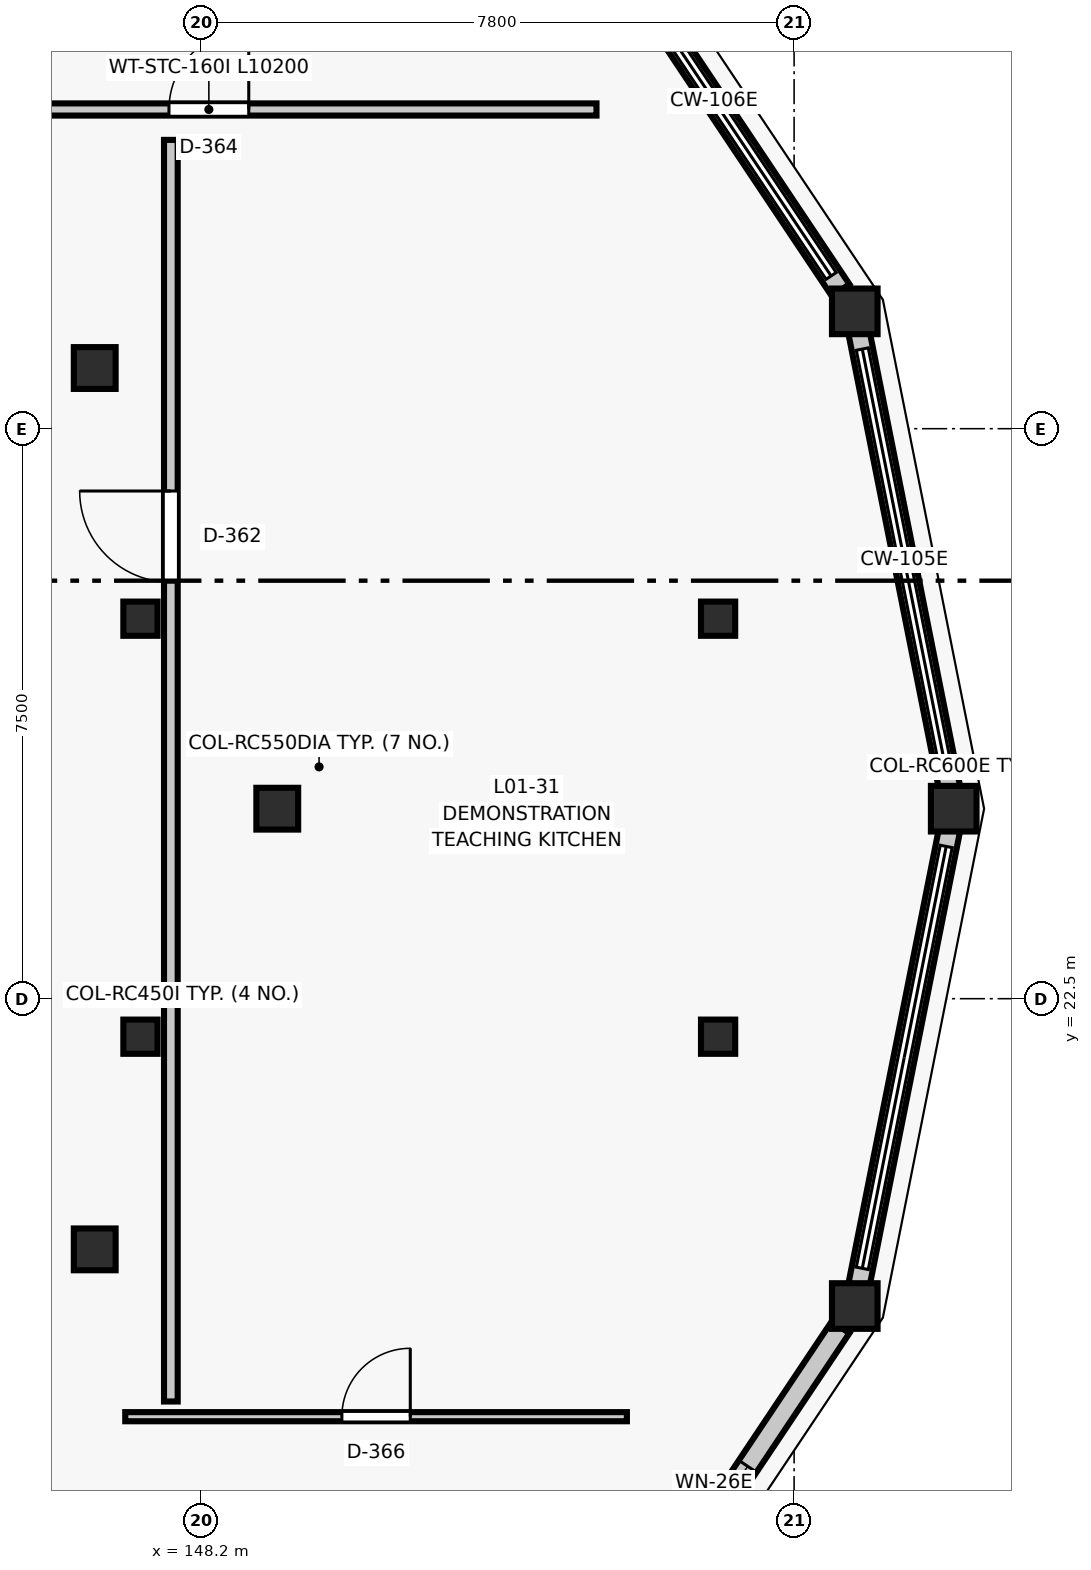
"""IFC4 building model, lengths in metres.
Left out: names, types, materials, properties, quantities, classifications, styles, units other than length and angle.
Written with IfcOpenShell. Run it as: python <this file> out.ifc"""

import sys

from ifc_helpers import new_model, si_unit, direction, frame, frame_2d, origin, origin_2d, place, context, subcontext, project, spatial, rectangle, circle, extrude, element, fill, save


model = new_model("IFC4")
c1 = context("Model", 3, precision=1e-05, world=origin(), true_north=direction((0.0, 1.0)))
c2 = subcontext(c1, "Body", "Model", "MODEL_VIEW")
j1 = project(units=[si_unit("LENGTHUNIT", "METRE"), si_unit("PLANEANGLEUNIT", "RADIAN")], contexts=[c1])
p1 = place(None, origin())
s1 = spatial("IfcSite", under=j1, at=p1, CompositionType="ELEMENT")
p2 = place(p1, origin())
s2 = spatial("IfcBuilding", under=s1, at=p2, CompositionType="ELEMENT")
p3 = place(p2, frame((0.0, 0.0, 4.5)))
s3 = spatial("IfcBuildingStorey", under=s2, at=p3, CompositionType="ELEMENT", Elevation=4.5)
for number, where, z_axis, x_axis in (
    (1, (147.4, 22.0, 0.0), (0.0, 0.0, 1.0), (1.0, 0.0, 0.0)),
    (2, (155.0, 22.0, 0.0), (0.0, 0.0, 1.0), (1.0, 0.0, 0.0)),
    (3, (155.0, 27.5, 0.0), (0.0, 0.0, 1.0), (1.0, 0.0, 0.0)),
    (4, (147.4, 27.5, 0.0), (0.0, 0.0, 1.0), (1.0, 0.0, 0.0)),
):
    element("IfcColumn", number, at=place(p3, frame(where, z_axis=z_axis, x_axis=x_axis)), inside=s3, PredefinedType="COLUMN", context=c2, shape_type="SweptSolid", body=[
        extrude(rectangle(XDim=0.45, YDim=0.45, at=origin_2d()), origin(), (0.0, 0.0, 1.0), 4.2),
    ])
for number, where, z_axis, x_axis in (
    (5, (149.2, 25.0, 0.0), (0.0, 0.0, 1.0), (1.0, 0.0, 0.0)),
    (6, (146.798, 30.798, 0.0), (0.0, 0.0, 1.0), (1.0, 0.0, 0.0)),
    (7, (146.798, 19.202, 0.0), (0.0, 0.0, 1.0), (1.0, 0.0, 0.0)),
):
    element("IfcColumn", number, at=place(p3, frame(where, z_axis=z_axis, x_axis=x_axis)), inside=s3, PredefinedType="COLUMN", context=c2, shape_type="SweptSolid", body=[
        extrude(circle(Radius=0.275, at=origin_2d()), origin(), (0.0, 0.0, 1.0), 4.2),
    ])
for number, where, z_axis, x_axis in (
    (8, (158.1, 25.0, 0.0), (0.0, 0.0, 1.0), (1.0, 0.0, 0.0)),
    (9, (156.798, 31.544, 0.0), (0.0, 0.0, 1.0), (1.0, 0.0, 0.0)),
    (10, (156.798, 18.456, 0.0), (0.0, 0.0, 1.0), (1.0, 0.0, 0.0)),
):
    element("IfcColumn", number, at=place(p3, frame(where, z_axis=z_axis, x_axis=x_axis)), inside=s3, PredefinedType="COLUMN", context=c2, shape_type="SweptSolid", body=[
        extrude(rectangle(XDim=0.6, YDim=0.6, at=origin_2d()), origin(), (0.0, 0.0, 1.0), 4.2),
    ])
p4 = place(p3, frame((156.853, 31.268, 0.0), z_axis=(0.0, 0.0, 1.0), x_axis=(0.195101780047, -0.98078300119, 0.0)))
e11 = element("IfcWall", 11, at=p4, inside=s3, PredefinedType="STANDARD", context=c2, shape_type="SweptSolid", body=[
    extrude(rectangle(XDim=6.11, YDim=0.28, at=frame_2d((3.055, 0.0))), origin(), (0.0, 0.0, 1.0), 0.8),
])
p5 = place(p3, frame((153.278, 36.812, 0.0), z_axis=(0.0, 0.0, 1.0), x_axis=(0.555573083966, -0.831467707354, 0.0)))
e12 = element("IfcWall", 12, at=p5, inside=s3, PredefinedType="STANDARD", context=c2, shape_type="SweptSolid", body=[
    extrude(rectangle(XDim=6.0, YDim=0.28, at=frame_2d((3.0, 0.0))), origin(), (0.0, 0.0, 1.0), 0.8),
])
p6 = place(p3, frame((156.612, 18.177, 0.0), z_axis=(0.0, 0.0, 1.0), x_axis=(-0.555573083966, -0.831467707354, 0.0)))
e13 = element("IfcWall", 13, at=p6, inside=s3, PredefinedType="STANDARD", context=c2, shape_type="SweptSolid", body=[
    extrude(rectangle(XDim=6.0, YDim=0.28, at=frame_2d((3.0, 0.0))), origin(), (0.0, 0.0, 1.0), 3.195),
])
p7 = place(p6, frame((2.2, 0.0, 0.85)))
e14 = element("IfcOpeningElement", 14, at=p7, cuts=e13, PredefinedType="OPENING", context=c2, shape_type="SweptSolid", body=[
    extrude(rectangle(XDim=1.6, YDim=1.95, at=frame_2d((0.8, 0.975))), frame((0.0, 0.15, 0.0), z_axis=(0.0, -1.0, 0.0), x_axis=(1.0, 0.0, 0.0)), (0.0, 0.0, 1.0), 0.3),
])
p8 = place(p3, frame((158.045, 24.725, 0.0), z_axis=(0.0, 0.0, 1.0), x_axis=(-0.195101780047, -0.98078300119, 0.0)))
e15 = element("IfcWall", 15, at=p8, inside=s3, PredefinedType="STANDARD", context=c2, shape_type="SweptSolid", body=[
    extrude(rectangle(XDim=6.11, YDim=0.28, at=frame_2d((3.055, 0.0))), origin(), (0.0, 0.0, 1.0), 0.8),
])
p9 = place(p3, frame((147.8, 17.2, 0.0), z_axis=(0.0, 0.0, 1.0), x_axis=(0.0, 1.0, 0.0)))
e16 = element("IfcWall", 16, at=p9, inside=s3, PredefinedType="PARTITIONING", context=c2, shape_type="SweptSolid", body=[
    extrude(rectangle(XDim=16.6, YDim=0.18, at=frame_2d((8.3, 0.0))), origin(), (0.0, 0.0, 1.0), 3.955),
])
p10 = place(p9, frame((10.78, 0.0, 0.0)))
e17 = element("IfcOpeningElement", 17, at=p10, cuts=e16, PredefinedType="OPENING", context=c2, shape_type="SweptSolid", body=[
    extrude(rectangle(XDim=1.2, YDim=2.15, at=frame_2d((0.6, 1.075))), frame((0.0, 0.1, 0.0), z_axis=(0.0, -1.0, 0.0), x_axis=(1.0, 0.0, 0.0)), (0.0, 0.0, 1.0), 0.2),
])
p11 = place(p3, frame((143.2, 34.2, 0.0), z_axis=(0.0, 0.0, 1.0), x_axis=(1.0, 0.0, 0.0)))
e18 = element("IfcWall", 18, at=p11, inside=s3, PredefinedType="PARTITIONING", context=c2, shape_type="SweptSolid", body=[
    extrude(rectangle(XDim=10.2, YDim=0.16, at=frame_2d((5.1, 0.0))), origin(), (0.0, 0.0, 1.0), 3.955),
])
p12 = place(p11, frame((4.575, 0.0, 0.0)))
e19 = element("IfcOpeningElement", 19, at=p12, cuts=e18, PredefinedType="OPENING", context=c2, shape_type="SweptSolid", body=[
    extrude(rectangle(XDim=1.05, YDim=2.1, at=frame_2d((0.525, 1.05))), frame((0.0, 0.09, 0.0), z_axis=(0.0, -1.0, 0.0), x_axis=(1.0, 0.0, 0.0)), (0.0, 0.0, 1.0), 0.18),
])
p13 = place(p3, frame((147.2, 17.0, 0.0), z_axis=(0.0, 0.0, 1.0), x_axis=(1.0, 0.0, 0.0)))
e20 = element("IfcWall", 20, at=p13, inside=s3, PredefinedType="PARTITIONING", context=c2, shape_type="SweptSolid", body=[
    extrude(rectangle(XDim=6.6, YDim=0.12, at=frame_2d((3.3, 0.0))), origin(), (0.0, 0.0, 1.0), 3.955),
])
p14 = place(p13, frame((2.85, 0.0, 0.0)))
e21 = element("IfcOpeningElement", 21, at=p14, cuts=e20, PredefinedType="OPENING", context=c2, shape_type="SweptSolid", body=[
    extrude(rectangle(XDim=0.9, YDim=2.1, at=frame_2d((0.45, 1.05))), frame((0.0, 0.07, 0.0), z_axis=(0.0, -1.0, 0.0), x_axis=(1.0, 0.0, 0.0)), (0.0, 0.0, 1.0), 0.14),
])
p15 = place(p7, origin())
e22 = element("IfcWindow", 22, at=p15, inside=s3, PartitioningType="SINGLE_PANEL", PredefinedType="WINDOW", context=c2, shape_type="SweptSolid", body=[
    extrude(rectangle(XDim=1.6, YDim=1.95, at=frame_2d((0.8, 0.975))), frame((0.0, 0.03, 0.0), z_axis=(0.0, -1.0, 0.0), x_axis=(1.0, 0.0, 0.0)), (0.0, 0.0, 1.0), 0.06),
])
fill(e14, e22)
p16 = place(p10, origin())
e23 = element("IfcDoor", 23, at=p16, inside=s3, OperationType="SINGLE_SWING_RIGHT", PredefinedType="DOOR", context=c2, shape_type="SweptSolid", body=[
    extrude(rectangle(XDim=1.2, YDim=2.15, at=frame_2d((0.6, 1.075))), frame((0.0, 0.025, 0.0), z_axis=(0.0, -1.0, 0.0), x_axis=(1.0, 0.0, 0.0)), (0.0, 0.0, 1.0), 0.05),
])
fill(e17, e23)
p17 = place(p12, origin())
e24 = element("IfcDoor", 24, at=p17, inside=s3, OperationType="SINGLE_SWING_RIGHT", PredefinedType="DOOR", context=c2, shape_type="SweptSolid", body=[
    extrude(rectangle(XDim=1.05, YDim=2.1, at=frame_2d((0.525, 1.05))), frame((0.0, 0.025, 0.0), z_axis=(0.0, -1.0, 0.0), x_axis=(1.0, 0.0, 0.0)), (0.0, 0.0, 1.0), 0.05),
])
fill(e19, e24)
p18 = place(p14, origin())
e25 = element("IfcDoor", 25, at=p18, inside=s3, OperationType="SINGLE_SWING_RIGHT", PredefinedType="DOOR", context=c2, shape_type="SweptSolid", body=[
    extrude(rectangle(XDim=0.9, YDim=2.1, at=frame_2d((0.45, 1.05))), frame((0.0, 0.025, 0.0), z_axis=(0.0, -1.0, 0.0), x_axis=(1.0, 0.0, 0.0)), (0.0, 0.0, 1.0), 0.05),
])
fill(e21, e25)
save(model, sys.argv[1])
